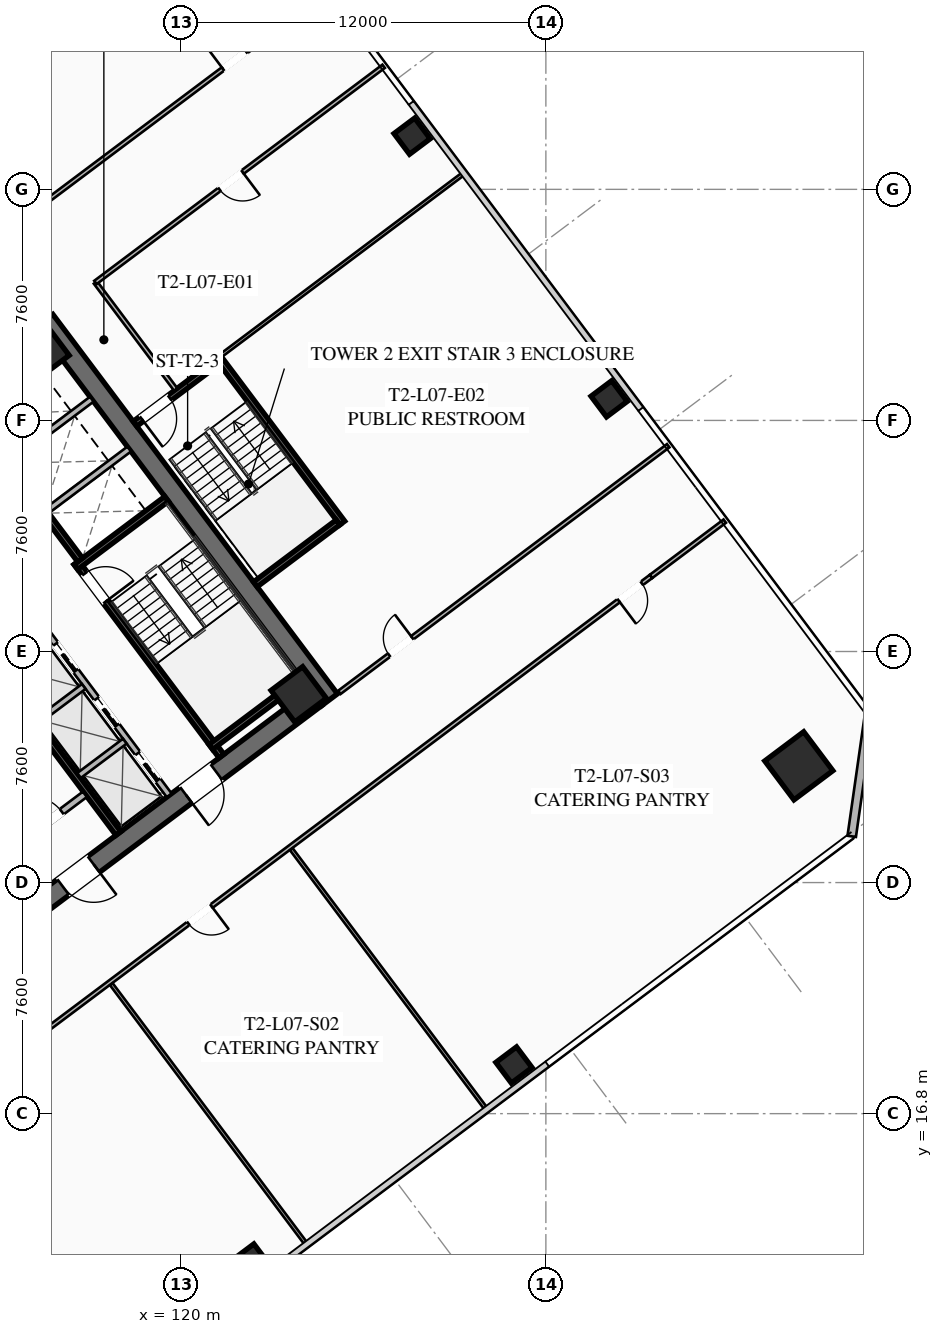
"""IFC4 building model, lengths in metres.
Left out: names, types, materials, properties, quantities, classifications, styles, units other than length and angle.
Written with IfcOpenShell. Run it as: python <this file> out.ifc"""

import sys

from ifc_helpers import new_model, si_unit, direction, frame, frame_2d, origin, origin_2d, place, context, subcontext, project, spatial, rectangle, hollow_rectangle, extrude, element, fill, save


model = new_model("IFC4")
c1 = context("Model", 3, precision=1e-05, world=origin(), true_north=direction((0.0, 1.0)))
c2 = subcontext(c1, "Body", "Model", "MODEL_VIEW")
j1 = project(units=[si_unit("LENGTHUNIT", "METRE"), si_unit("PLANEANGLEUNIT", "RADIAN")], contexts=[c1])
p1 = place(None, origin())
s1 = spatial("IfcSite", under=j1, at=p1, CompositionType="ELEMENT")
p2 = place(p1, origin())
s2 = spatial("IfcBuilding", under=s1, at=p2, CompositionType="ELEMENT")
p3 = place(p2, frame((0.0, 0.0, 31.7)))
s3 = spatial("IfcBuildingStorey", under=s2, at=p3, CompositionType="ELEMENT", Elevation=31.7)
p4 = place(p3, frame((115.524, 42.893, 0.0), z_axis=(0.0, 0.0, 1.0), x_axis=(0.600005007985, -0.799996243986, 0.0)))
e1 = element("IfcWall", 1, at=p4, inside=s3, PredefinedType="SHEAR", context=c2, shape_type="SweptSolid", body=[
    extrude(rectangle(XDim=15.6, YDim=0.65, at=frame_2d((7.8, 0.0))), origin(), (0.0, 0.0, 1.0), 3.55),
])
p5 = place(p3, frame((124.429, 30.478, 0.0), z_axis=(0.0, 0.0, 1.0), x_axis=(-0.799998028465, -0.600002628705, 0.0)))
e2 = element("IfcWall", 2, at=p5, inside=s3, PredefinedType="SHEAR", context=c2, shape_type="SweptSolid", body=[
    extrude(rectangle(XDim=14.86, YDim=0.65, at=frame_2d((7.43, 0.0))), origin(), (0.0, 0.0, 1.0), 3.55),
])
p6 = place(p5, frame((9.13, 0.0, 0.0)))
e3 = element("IfcOpeningElement", 3, at=p6, cuts=e2, PredefinedType="OPENING", context=c2, shape_type="SweptSolid", body=[
    extrude(rectangle(XDim=1.25, YDim=2.25, at=frame_2d((0.625, 1.125))), frame((0.0, 0.335, 0.0), z_axis=(0.0, -1.0, 0.0), x_axis=(1.0, 0.0, 0.0)), (0.0, 0.0, 1.0), 0.67),
])
p7 = place(p5, frame((4.08, 0.0, 0.0)))
e4 = element("IfcOpeningElement", 4, at=p7, cuts=e2, PredefinedType="OPENING", context=c2, shape_type="SweptSolid", body=[
    extrude(rectangle(XDim=1.25, YDim=2.25, at=frame_2d((0.625, 1.125))), frame((0.0, 0.335, 0.0), z_axis=(0.0, -1.0, 0.0), x_axis=(1.0, 0.0, 0.0)), (0.0, 0.0, 1.0), 0.67),
])
for number, where, z_axis, x_axis in (
    (5, (123.87, 30.59, 0.0), (0.0, 0.0, 1.0), (0.8, 0.6, 0.0)),
    (6, (115.41, 41.87, 0.0), (0.0, 0.0, 1.0), (0.8, 0.6, 0.0)),
):
    element("IfcColumn", number, at=place(p3, frame(where, z_axis=z_axis, x_axis=x_axis)), inside=s3, PredefinedType="COLUMN", context=c2, shape_type="SweptSolid", body=[
        extrude(hollow_rectangle(XDim=1.3, YDim=1.3, WallThickness=0.05, at=origin_2d()), origin(), (0.0, 0.0, 1.0), 3.35),
    ])
p8 = place(p3, frame((140.32, 28.24, 0.0), z_axis=(0.0, 0.0, 1.0), x_axis=(0.799999996291, 0.600000004945, 0.0)))
e7 = element("IfcColumn", 7, at=p8, inside=s3, PredefinedType="COLUMN", context=c2, shape_type="SweptSolid", body=[
    extrude(hollow_rectangle(XDim=1.6, YDim=1.6, WallThickness=0.06, at=origin_2d()), origin(), (0.0, 0.0, 1.0), 3.35),
])
for number, where, z_axis, x_axis in (
    (8, (122.31, 11.92, 0.0), (0.0, 0.0, 1.0), (0.8, 0.6, 0.0)),
    (9, (130.95, 18.4, 0.0), (0.0, 0.0, 1.0), (0.8, 0.6, 0.0)),
    (10, (134.08, 40.31, 0.0), (0.0, 0.0, 1.0), (0.8, 0.6, 0.0)),
    (11, (127.6, 48.95, 0.0), (0.0, 0.0, 1.0), (0.8, 0.6, 0.0)),
):
    element("IfcColumn", number, at=place(p3, frame(where, z_axis=z_axis, x_axis=x_axis)), inside=s3, PredefinedType="COLUMN", context=c2, shape_type="SweptSolid", body=[
        extrude(hollow_rectangle(XDim=0.85, YDim=0.85, WallThickness=0.035, at=origin_2d()), origin(), (0.0, 0.0, 1.0), 3.35),
    ])
p9 = place(p3, frame((142.64, 29.98, 0.0), z_axis=(0.0, 0.0, 1.0), x_axis=(-0.14137968631, -0.989955445613, 0.0)))
e12 = element("IfcWall", 12, at=p9, inside=s3, PredefinedType="SOLIDWALL", context=c2, shape_type="SweptSolid", body=[
    extrude(rectangle(XDim=4.101, YDim=0.28, at=frame_2d((2.051, 0.0))), origin(), (0.0, 0.0, 1.0), 3.35),
])
p10 = place(p3, frame((116.56, 34.92, 0.0), z_axis=(0.0, 0.0, 1.0), x_axis=(0.600009827119, -0.799992629566, 0.0)))
e13 = element("IfcWall", 13, at=p10, inside=s3, PredefinedType="SHEAR", context=c2, shape_type="SweptSolid", body=[
    extrude(rectangle(XDim=7.95, YDim=0.2, at=frame_2d((3.975, 0.0))), origin(), (0.0, 0.0, 1.0), 3.35),
])
p11 = place(p10, frame((0.45, 0.0, 0.0)))
e14 = element("IfcOpeningElement", 14, at=p11, cuts=e13, PredefinedType="OPENING", context=c2, shape_type="SweptSolid", body=[
    extrude(rectangle(XDim=1.15, YDim=2.2, at=frame_2d((0.575, 1.1))), frame((0.0, 0.11, 0.0), z_axis=(0.0, -1.0, 0.0), x_axis=(1.0, 0.0, 0.0)), (0.0, 0.0, 1.0), 0.22),
])
for number, where, z_axis, x_axis in (
    (15, (116.54, 34.78, 0.0), (0.0, 0.0, 1.0), (0.8, 0.6, 0.0)),
    (16, (120.98, 28.86, 0.0), (0.0, 0.0, 1.0), (0.8, 0.6, 0.0)),
):
    element("IfcWall", number, at=place(p3, frame(where, z_axis=z_axis, x_axis=x_axis)), inside=s3, PredefinedType="SHEAR", context=c2, shape_type="SweptSolid", body=[
        extrude(rectangle(XDim=3.73, YDim=0.2, at=frame_2d((1.865, 0.0))), origin(), (0.0, 0.0, 1.0), 3.35),
    ])
p12 = place(p3, frame((117.938, 26.016, 0.0), z_axis=(0.0, 0.0, 1.0), x_axis=(-0.600005463273, 0.799995902516, 0.0)))
e17 = element("IfcWall", 17, at=p12, inside=s3, PredefinedType="SHEAR", context=c2, shape_type="SweptSolid", body=[
    extrude(rectangle(XDim=14.3, YDim=0.2, at=frame_2d((7.15, 0.0))), origin(), (0.0, 0.0, 1.0), 3.35),
])
p13 = place(p3, frame((114.316, 25.412, 0.0), z_axis=(0.0, 0.0, 1.0), x_axis=(0.800018601094, 0.59997519774, 0.0)))
e18 = element("IfcWall", 18, at=p13, inside=s3, PredefinedType="SOLIDWALL", context=c2, shape_type="SweptSolid", body=[
    extrude(rectangle(XDim=3.15, YDim=0.22, at=frame_2d((1.575, 0.0))), origin(), (0.0, 0.0, 1.0), 2.703),
])
p14 = place(p13, frame((0.95, 0.0, 0.0)))
e19 = element("IfcOpeningElement", 19, at=p14, cuts=e18, PredefinedType="OPENING", context=c2, shape_type="SweptSolid", body=[
    extrude(rectangle(XDim=1.25, YDim=2.25, at=frame_2d((0.625, 1.125))), frame((0.0, 0.12, 0.0), z_axis=(0.0, -1.0, 0.0), x_axis=(1.0, 0.0, 0.0)), (0.0, 0.0, 1.0), 0.24),
])
p15 = place(p3, frame((112.87, 40.09, 0.0), z_axis=(0.0, 0.0, 1.0), x_axis=(0.599975393228, -0.800018454488, 0.0)))
e20 = element("IfcWall", 20, at=p15, inside=s3, PredefinedType="SHEAR", context=c2, shape_type="SweptSolid", body=[
    extrude(rectangle(XDim=6.35, YDim=0.2, at=frame_2d((3.175, 0.0))), origin(), (0.0, 0.0, 1.0), 3.35),
])
for number, where, z_axis, x_axis in (
    (21, (115.59, 36.63, 0.0), (0.0, 0.0, 1.0), (0.8, 0.6, 0.0)),
    (22, (114.36, 38.27, 0.0), (0.0, 0.0, 1.0), (0.8, 0.6, 0.0)),
):
    element("IfcWall", number, at=place(p3, frame(where, z_axis=z_axis, x_axis=x_axis)), inside=s3, PredefinedType="SOLIDWALL", context=c2, shape_type="SweptSolid", body=[
        extrude(rectangle(XDim=3.38, YDim=0.2, at=frame_2d((1.69, 0.0))), origin(), (0.0, 0.0, 1.0), 3.35),
    ])
p16 = place(p3, frame((119.61, 27.27, 0.0), z_axis=(0.0, 0.0, 1.0), x_axis=(-0.600011488909, 0.79999138319, 0.0)))
e23 = element("IfcWall", 23, at=p16, inside=s3, PredefinedType="SOLIDWALL", context=c2, shape_type="SweptSolid", body=[
    extrude(rectangle(XDim=6.8, YDim=0.2, at=frame_2d((3.4, 0.0))), origin(), (0.0, 0.0, 1.0), 3.35),
])
p17 = place(p16, frame((0.625, 0.0, 0.0)))
e24 = element("IfcOpeningElement", 24, at=p17, cuts=e23, PredefinedType="OPENING", context=c2, shape_type="SweptSolid", body=[
    extrude(rectangle(XDim=1.1, YDim=2.2, at=frame_2d((0.55, 1.1))), frame((0.0, 0.11, 0.0), z_axis=(0.0, -1.0, 0.0), x_axis=(1.0, 0.0, 0.0)), (0.0, 0.0, 1.0), 0.22),
])
p18 = place(p16, frame((2.875, 0.0, 0.0)))
e25 = element("IfcOpeningElement", 25, at=p18, cuts=e23, PredefinedType="OPENING", context=c2, shape_type="SweptSolid", body=[
    extrude(rectangle(XDim=1.1, YDim=2.2, at=frame_2d((0.55, 1.1))), frame((0.0, 0.11, 0.0), z_axis=(0.0, -1.0, 0.0), x_axis=(1.0, 0.0, 0.0)), (0.0, 0.0, 1.0), 0.22),
])
p19 = place(p16, frame((5.125, 0.0, 0.0)))
e26 = element("IfcOpeningElement", 26, at=p19, cuts=e23, PredefinedType="OPENING", context=c2, shape_type="SweptSolid", body=[
    extrude(rectangle(XDim=1.1, YDim=2.2, at=frame_2d((0.55, 1.1))), frame((0.0, 0.11, 0.0), z_axis=(0.0, -1.0, 0.0), x_axis=(1.0, 0.0, 0.0)), (0.0, 0.0, 1.0), 0.22),
])
p20 = place(p3, frame((116.646, 27.922, 0.0), z_axis=(0.0, 0.0, 1.0), x_axis=(0.8, 0.6, 0.0)))
e27 = element("IfcWall", 27, at=p20, inside=s3, PredefinedType="SOLIDWALL", context=c2, shape_type="SweptSolid", body=[
    extrude(rectangle(XDim=1.88, YDim=0.2, at=frame_2d((0.94, 0.0))), origin(), (0.0, 0.0, 1.0), 3.35),
])
p21 = place(p3, frame((115.296, 29.722, 0.0), z_axis=(0.0, 0.0, 1.0), x_axis=(0.799984418148, 0.600020775241, 0.0)))
e28 = element("IfcWall", 28, at=p21, inside=s3, PredefinedType="SOLIDWALL", context=c2, shape_type="SweptSolid", body=[
    extrude(rectangle(XDim=1.88, YDim=0.2, at=frame_2d((0.94, 0.0))), origin(), (0.0, 0.0, 1.0), 3.35),
])
p22 = place(p3, frame((125.304, 36.228, 0.0), z_axis=(0.0, 0.0, 1.0), x_axis=(-0.59998851072, 0.800008616831, 0.0)))
e29 = element("IfcWall", 29, at=p22, inside=s3, PredefinedType="SHEAR", context=c2, shape_type="SweptSolid", body=[
    extrude(rectangle(XDim=6.8, YDim=0.2, at=frame_2d((3.4, 0.0))), origin(), (0.0, 0.0, 1.0), 3.35),
])
p23 = place(p3, frame((121.204, 41.528, 0.0), z_axis=(0.0, 0.0, 1.0), x_axis=(-0.800017232136, -0.599977023131, 0.0)))
e30 = element("IfcWall", 30, at=p23, inside=s3, PredefinedType="SHEAR", context=c2, shape_type="SweptSolid", body=[
    extrude(rectangle(XDim=3.4, YDim=0.2, at=frame_2d((1.7, 0.0))), origin(), (0.0, 0.0, 1.0), 3.35),
])
p24 = place(p23, frame((1.975, 0.0, 0.0)))
e31 = element("IfcOpeningElement", 31, at=p24, cuts=e30, PredefinedType="OPENING", context=c2, shape_type="SweptSolid", body=[
    extrude(rectangle(XDim=1.15, YDim=2.2, at=frame_2d((0.575, 1.1))), frame((0.0, 0.11, 0.0), z_axis=(0.0, -1.0, 0.0), x_axis=(1.0, 0.0, 0.0)), (0.0, 0.0, 1.0), 0.22),
])
p25 = place(p3, frame((122.444, 34.208, 0.0), z_axis=(0.0, 0.0, 1.0), x_axis=(0.79999138319, 0.600011488909, 0.0)))
e32 = element("IfcWall", 32, at=p25, inside=s3, PredefinedType="SHEAR", context=c2, shape_type="SweptSolid", body=[
    extrude(rectangle(XDim=3.4, YDim=0.2, at=frame_2d((1.7, 0.0))), origin(), (0.0, 0.0, 1.0), 3.35),
])
p26 = place(p3, frame((119.824, 40.618, 0.0), z_axis=(0.0, 0.0, 1.0), x_axis=(-0.599982243973, 0.800013316712, 0.0)))
e33 = element("IfcWall", 33, at=p26, inside=s3, PredefinedType="PARTITIONING", context=c2, shape_type="SweptSolid", body=[
    extrude(rectangle(XDim=4.4, YDim=0.135, at=frame_2d((2.2, 0.0))), origin(), (0.0, 0.0, 1.0), 2.703),
])
p27 = place(p3, frame((98.516, 34.012, 0.0), z_axis=(0.0, 0.0, 1.0), x_axis=(0.799998035726, 0.600002619023, 0.0)))
e34 = element("IfcWall", 34, at=p27, inside=s3, PredefinedType="PARTITIONING", context=c2, shape_type="SweptSolid", body=[
    extrude(rectangle(XDim=29.83, YDim=0.135, at=frame_2d((14.915, 0.0))), origin(), (0.0, 0.0, 1.0), 2.703),
])
p28 = place(p27, frame((0.3, 0.0, 0.0)))
e35 = element("IfcOpeningElement", 35, at=p28, cuts=e34, PredefinedType="OPENING", context=c2, shape_type="SweptSolid", body=[
    extrude(rectangle(XDim=0.95, YDim=2.05, at=frame_2d((0.475, 1.025))), frame((0.0, 0.077, 0.0), z_axis=(0.0, -1.0, 0.0), x_axis=(1.0, 0.0, 0.0)), (0.0, 0.0, 1.0), 0.155),
])
p29 = place(p27, frame((10.829, 0.0, 0.0)))
e36 = element("IfcOpeningElement", 36, at=p29, cuts=e34, PredefinedType="OPENING", context=c2, shape_type="SweptSolid", body=[
    extrude(rectangle(XDim=0.95, YDim=2.05, at=frame_2d((0.475, 1.025))), frame((0.0, 0.077, 0.0), z_axis=(0.0, -1.0, 0.0), x_axis=(1.0, 0.0, 0.0)), (0.0, 0.0, 1.0), 0.155),
])
p30 = place(p27, frame((28.58, 0.0, 0.0)))
e37 = element("IfcOpeningElement", 37, at=p30, cuts=e34, PredefinedType="OPENING", context=c2, shape_type="SweptSolid", body=[
    extrude(rectangle(XDim=0.95, YDim=2.05, at=frame_2d((0.475, 1.025))), frame((0.0, 0.077, 0.0), z_axis=(0.0, -1.0, 0.0), x_axis=(1.0, 0.0, 0.0)), (0.0, 0.0, 1.0), 0.155),
])
p31 = place(p3, frame((135.46, 34.47, 0.0), z_axis=(0.0, 0.0, 1.0), x_axis=(-0.800000982127, -0.599998690494, 0.0)))
e38 = element("IfcWall", 38, at=p31, inside=s3, PredefinedType="PARTITIONING", context=c2, shape_type="SweptSolid", body=[
    extrude(rectangle(XDim=29.83, YDim=0.135, at=frame_2d((14.915, 0.0))), origin(), (0.0, 0.0, 1.0), 2.703),
])
p32 = place(p31, frame((28.5, 0.0, 0.0)))
e39 = element("IfcOpeningElement", 39, at=p32, cuts=e38, PredefinedType="OPENING", context=c2, shape_type="SweptSolid", body=[
    extrude(rectangle(XDim=0.95, YDim=2.05, at=frame_2d((0.475, 1.025))), frame((0.0, 0.077, 0.0), z_axis=(0.0, -1.0, 0.0), x_axis=(1.0, 0.0, 0.0)), (0.0, 0.0, 1.0), 0.155),
])
p33 = place(p31, frame((18.075, 0.0, 0.0)))
e40 = element("IfcOpeningElement", 40, at=p33, cuts=e38, PredefinedType="OPENING", context=c2, shape_type="SweptSolid", body=[
    extrude(rectangle(XDim=0.95, YDim=2.05, at=frame_2d((0.475, 1.025))), frame((0.0, 0.077, 0.0), z_axis=(0.0, -1.0, 0.0), x_axis=(1.0, 0.0, 0.0)), (0.0, 0.0, 1.0), 0.155),
])
p34 = place(p31, frame((0.38, 0.0, 0.0)))
e41 = element("IfcOpeningElement", 41, at=p34, cuts=e38, PredefinedType="OPENING", context=c2, shape_type="SweptSolid", body=[
    extrude(rectangle(XDim=0.95, YDim=2.05, at=frame_2d((0.475, 1.025))), frame((0.0, 0.077, 0.0), z_axis=(0.0, -1.0, 0.0), x_axis=(1.0, 0.0, 0.0)), (0.0, 0.0, 1.0), 0.155),
])
p35 = place(p3, frame((135.46, 34.47, 0.0), z_axis=(0.0, 0.0, 1.0), x_axis=(0.799990331366, 0.600012891296, 0.0)))
e42 = element("IfcWall", 42, at=p35, inside=s3, PredefinedType="PARTITIONING", context=c2, shape_type="SweptSolid", body=[
    extrude(rectangle(XDim=3.03, YDim=0.135, at=frame_2d((1.515, 0.0))), origin(), (0.0, 0.0, 1.0), 2.703),
])
p36 = place(p3, frame((124.128, 12.496, 0.0), z_axis=(0.0, 0.0, 1.0), x_axis=(-0.600003650761, 0.799997261916, 0.0)))
e43 = element("IfcWall", 43, at=p36, inside=s3, PredefinedType="PARTITIONING", context=c2, shape_type="SweptSolid", body=[
    extrude(rectangle(XDim=10.7, YDim=0.11, at=frame_2d((5.35, 0.0))), origin(), (0.0, 0.0, 1.0), 2.703),
])
p37 = place(p3, frame((130.048, 16.936, 0.0), z_axis=(0.0, 0.0, 1.0), x_axis=(-0.600007301277, 0.79999452399, 0.0)))
e44 = element("IfcWall", 44, at=p37, inside=s3, PredefinedType="PARTITIONING", context=c2, shape_type="SweptSolid", body=[
    extrude(rectangle(XDim=10.7, YDim=0.11, at=frame_2d((5.35, 0.0))), origin(), (0.0, 0.0, 1.0), 2.703),
])
p38 = place(p3, frame((126.664, 51.248, 0.0), z_axis=(0.0, 0.0, 1.0), x_axis=(-0.799995055373, -0.600006592779, 0.0)))
e45 = element("IfcWall", 45, at=p38, inside=s3, PredefinedType="PARTITIONING", context=c2, shape_type="SweptSolid", body=[
    extrude(rectangle(XDim=11.85, YDim=0.135, at=frame_2d((5.925, 0.0))), origin(), (0.0, 0.0, 1.0), 2.703),
])
p39 = place(p38, frame((5.8, 0.0, 0.0)))
e46 = element("IfcOpeningElement", 46, at=p39, cuts=e45, PredefinedType="OPENING", context=c2, shape_type="SweptSolid", body=[
    extrude(rectangle(XDim=0.95, YDim=2.05, at=frame_2d((0.475, 1.025))), frame((0.0, 0.077, 0.0), z_axis=(0.0, -1.0, 0.0), x_axis=(1.0, 0.0, 0.0)), (0.0, 0.0, 1.0), 0.155),
])
p40 = place(p3, frame((125.208, 30.656, 0.0), z_axis=(0.0, 0.0, 1.0), x_axis=(0.799995666112, 0.600005778473, 0.0)))
e47 = element("IfcWall", 47, at=p40, inside=s3, PredefinedType="PARTITIONING", context=c2, shape_type="SweptSolid", body=[
    extrude(rectangle(XDim=13.52, YDim=0.135, at=frame_2d((6.76, 0.0))), origin(), (0.0, 0.0, 1.0), 2.703),
])
p41 = place(p40, frame((2.045, 0.0, 0.0)))
e48 = element("IfcOpeningElement", 48, at=p41, cuts=e47, PredefinedType="OPENING", context=c2, shape_type="SweptSolid", body=[
    extrude(rectangle(XDim=0.95, YDim=2.05, at=frame_2d((0.475, 1.025))), frame((0.0, 0.077, 0.0), z_axis=(0.0, -1.0, 0.0), x_axis=(1.0, 0.0, 0.0)), (0.0, 0.0, 1.0), 0.155),
])
p42 = place(p3, frame((129.304, 47.728, 0.0), z_axis=(0.0, 0.0, 1.0), x_axis=(-0.8, -0.6, 0.0)))
e49 = element("IfcWall", 49, at=p42, inside=s3, PredefinedType="PARTITIONING", context=c2, shape_type="SweptSolid", body=[
    extrude(rectangle(XDim=10.0, YDim=0.11, at=frame_2d((5.0, 0.0))), origin(), (0.0, 0.0, 1.0), 2.703),
])
p43 = place(p6, origin())
e50 = element("IfcDoor", 50, at=p43, inside=s3, OperationType="SINGLE_SWING_LEFT", PredefinedType="DOOR", context=c2, shape_type="SweptSolid", body=[
    extrude(rectangle(XDim=1.25, YDim=2.25, at=frame_2d((0.625, 1.125))), frame((0.0, 0.025, 0.0), z_axis=(0.0, -1.0, 0.0), x_axis=(1.0, 0.0, 0.0)), (0.0, 0.0, 1.0), 0.05),
])
fill(e3, e50)
p44 = place(p7, origin())
e51 = element("IfcDoor", 51, at=p44, inside=s3, OperationType="SINGLE_SWING_RIGHT", PredefinedType="DOOR", context=c2, shape_type="SweptSolid", body=[
    extrude(rectangle(XDim=1.25, YDim=2.25, at=frame_2d((0.625, 1.125))), frame((0.0, 0.025, 0.0), z_axis=(0.0, -1.0, 0.0), x_axis=(1.0, 0.0, 0.0)), (0.0, 0.0, 1.0), 0.05),
])
fill(e4, e51)
p45 = place(p11, origin())
e52 = element("IfcDoor", 52, at=p45, inside=s3, OperationType="SINGLE_SWING_RIGHT", PredefinedType="DOOR", context=c2, shape_type="SweptSolid", body=[
    extrude(rectangle(XDim=1.15, YDim=2.2, at=frame_2d((0.575, 1.1))), frame((0.0, 0.025, 0.0), z_axis=(0.0, -1.0, 0.0), x_axis=(1.0, 0.0, 0.0)), (0.0, 0.0, 1.0), 0.05),
])
fill(e14, e52)
p46 = place(p14, origin())
e53 = element("IfcDoor", 53, at=p46, inside=s3, OperationType="SINGLE_SWING_LEFT", PredefinedType="DOOR", context=c2, shape_type="SweptSolid", body=[
    extrude(rectangle(XDim=1.25, YDim=2.25, at=frame_2d((0.625, 1.125))), frame((0.0, 0.025, 0.0), z_axis=(0.0, -1.0, 0.0), x_axis=(1.0, 0.0, 0.0)), (0.0, 0.0, 1.0), 0.05),
])
fill(e19, e53)
p47 = place(p24, origin())
e54 = element("IfcDoor", 54, at=p47, inside=s3, OperationType="SINGLE_SWING_RIGHT", PredefinedType="DOOR", context=c2, shape_type="SweptSolid", body=[
    extrude(rectangle(XDim=1.15, YDim=2.2, at=frame_2d((0.575, 1.1))), frame((0.0, 0.025, 0.0), z_axis=(0.0, -1.0, 0.0), x_axis=(1.0, 0.0, 0.0)), (0.0, 0.0, 1.0), 0.05),
])
fill(e31, e54)
p48 = place(p30, origin())
e55 = element("IfcDoor", 55, at=p48, inside=s3, OperationType="SINGLE_SWING_LEFT", PredefinedType="DOOR", context=c2, shape_type="SweptSolid", body=[
    extrude(rectangle(XDim=0.95, YDim=2.05, at=frame_2d((0.475, 1.025))), frame((0.0, 0.025, 0.0), z_axis=(0.0, -1.0, 0.0), x_axis=(1.0, 0.0, 0.0)), (0.0, 0.0, 1.0), 0.05),
])
fill(e37, e55)
p49 = place(p33, origin())
e56 = element("IfcDoor", 56, at=p49, inside=s3, OperationType="SINGLE_SWING_LEFT", PredefinedType="DOOR", context=c2, shape_type="SweptSolid", body=[
    extrude(rectangle(XDim=0.95, YDim=2.05, at=frame_2d((0.475, 1.025))), frame((0.0, 0.025, 0.0), z_axis=(0.0, -1.0, 0.0), x_axis=(1.0, 0.0, 0.0)), (0.0, 0.0, 1.0), 0.05),
])
fill(e40, e56)
p50 = place(p34, origin())
e57 = element("IfcDoor", 57, at=p50, inside=s3, OperationType="SINGLE_SWING_RIGHT", PredefinedType="DOOR", context=c2, shape_type="SweptSolid", body=[
    extrude(rectangle(XDim=0.95, YDim=2.05, at=frame_2d((0.475, 1.025))), frame((0.0, 0.025, 0.0), z_axis=(0.0, -1.0, 0.0), x_axis=(1.0, 0.0, 0.0)), (0.0, 0.0, 1.0), 0.05),
])
fill(e41, e57)
p51 = place(p39, origin())
e58 = element("IfcDoor", 58, at=p51, inside=s3, OperationType="SINGLE_SWING_LEFT", PredefinedType="DOOR", context=c2, shape_type="SweptSolid", body=[
    extrude(rectangle(XDim=0.95, YDim=2.05, at=frame_2d((0.475, 1.025))), frame((0.0, 0.025, 0.0), z_axis=(0.0, -1.0, 0.0), x_axis=(1.0, 0.0, 0.0)), (0.0, 0.0, 1.0), 0.05),
])
fill(e46, e58)
p52 = place(p41, origin())
e59 = element("IfcDoor", 59, at=p52, inside=s3, OperationType="SINGLE_SWING_RIGHT", PredefinedType="DOOR", context=c2, shape_type="SweptSolid", body=[
    extrude(rectangle(XDim=0.95, YDim=2.05, at=frame_2d((0.475, 1.025))), frame((0.0, 0.025, 0.0), z_axis=(0.0, -1.0, 0.0), x_axis=(1.0, 0.0, 0.0)), (0.0, 0.0, 1.0), 0.05),
])
fill(e48, e59)
p53 = place(p17, origin())
e60 = element("IfcDoor", 60, at=p53, inside=s3, OperationType="SLIDING_TO_LEFT", PredefinedType="DOOR", context=c2, shape_type="SweptSolid", body=[
    extrude(rectangle(XDim=1.1, YDim=2.2, at=frame_2d((0.55, 1.1))), frame((0.0, 0.025, 0.0), z_axis=(0.0, -1.0, 0.0), x_axis=(1.0, 0.0, 0.0)), (0.0, 0.0, 1.0), 0.05),
])
fill(e24, e60)
p54 = place(p18, origin())
e61 = element("IfcDoor", 61, at=p54, inside=s3, OperationType="SLIDING_TO_LEFT", PredefinedType="DOOR", context=c2, shape_type="SweptSolid", body=[
    extrude(rectangle(XDim=1.1, YDim=2.2, at=frame_2d((0.55, 1.1))), frame((0.0, 0.025, 0.0), z_axis=(0.0, -1.0, 0.0), x_axis=(1.0, 0.0, 0.0)), (0.0, 0.0, 1.0), 0.05),
])
fill(e25, e61)
p55 = place(p19, origin())
e62 = element("IfcDoor", 62, at=p55, inside=s3, OperationType="SLIDING_TO_LEFT", PredefinedType="DOOR", context=c2, shape_type="SweptSolid", body=[
    extrude(rectangle(XDim=1.1, YDim=2.2, at=frame_2d((0.55, 1.1))), frame((0.0, 0.025, 0.0), z_axis=(0.0, -1.0, 0.0), x_axis=(1.0, 0.0, 0.0)), (0.0, 0.0, 1.0), 0.05),
])
fill(e26, e62)
save(model, sys.argv[1])
